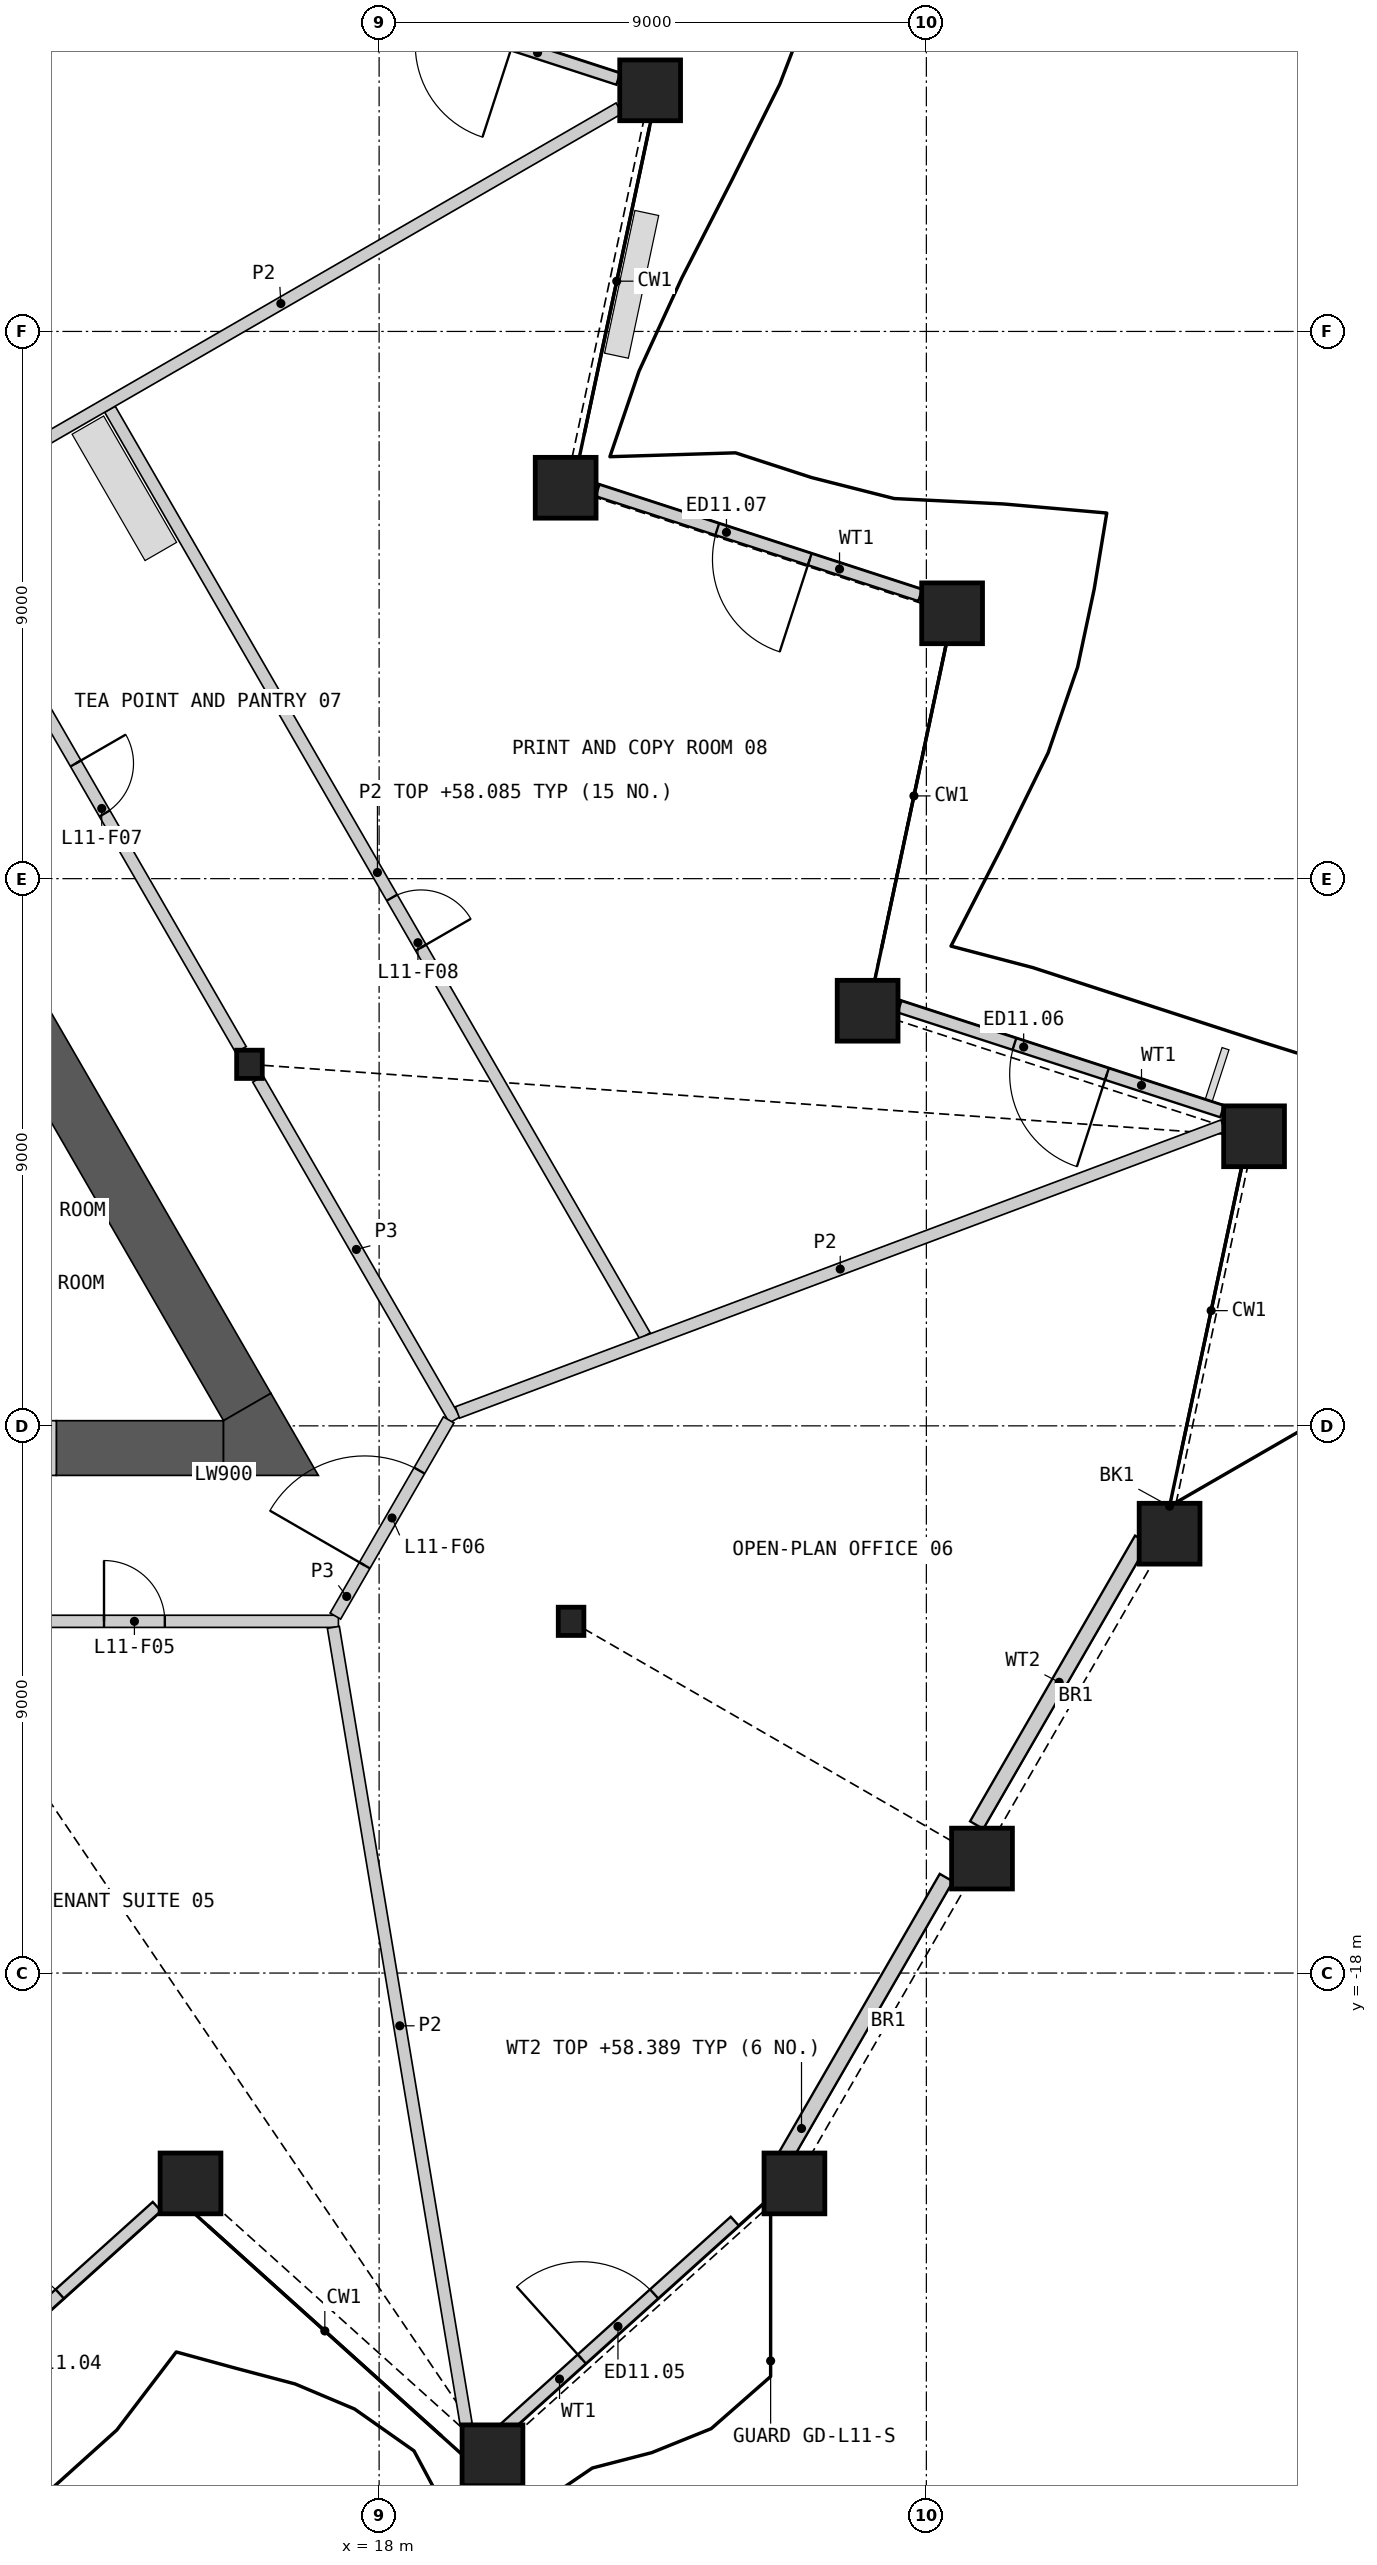
"""IFC4 building model, lengths in metres.
Left out: names, types, materials, properties, quantities, classifications, styles, units other than length and angle.
Written with IfcOpenShell. Run it as: python <this file> out.ifc"""

import sys

from ifc_helpers import new_model, si_unit, direction, frame, frame_2d, origin, origin_2d, place, context, subcontext, project, spatial, polyline, rectangle, hollow_rectangle, i_section, outline, extrude, element, fill, save


model = new_model("IFC4")
c1 = context("Model", 3, precision=1e-05, world=origin(), true_north=direction((0.0, 1.0)))
c2 = subcontext(c1, "Body", "Model", "MODEL_VIEW")
j1 = project(units=[si_unit("LENGTHUNIT", "METRE"), si_unit("PLANEANGLEUNIT", "RADIAN")], contexts=[c1])
p1 = place(None, origin())
s1 = spatial("IfcSite", under=j1, at=p1, CompositionType="ELEMENT")
p2 = place(p1, origin())
s2 = spatial("IfcBuilding", under=s1, at=p2, CompositionType="ELEMENT")
p3 = place(p2, frame((0.0, 0.0, 55.2)))
s3 = spatial("IfcBuildingStorey", under=s2, at=p3, CompositionType="ELEMENT", Elevation=55.2)
for number, where, z_axis, x_axis in (
    (1, (14.898, -21.46, 0.0), (0.0, 0.0, 1.0), (1.0, 0.0, 0.0)),
    (2, (19.864, -25.931, 0.0), (0.0, 0.0, 1.0), (1.0, 0.0, 0.0)),
    (3, (24.83, -21.46, 0.0), (0.0, 0.0, 1.0), (1.0, 0.0, 0.0)),
    (4, (27.915, -16.117, 0.0), (0.0, 0.0, 1.0), (1.0, 0.0, 0.0)),
    (5, (31.0, -10.774, 0.0), (0.0, 0.0, 1.0), (1.0, 0.0, 0.0)),
    (6, (32.389, -4.237, 0.0), (0.0, 0.0, 1.0), (1.0, 0.0, 0.0)),
    (7, (26.034, -2.172, 0.0), (0.0, 0.0, 1.0), (1.0, 0.0, 0.0)),
    (8, (27.423, 4.364, 0.0), (0.0, 0.0, 1.0), (1.0, 0.0, 0.0)),
    (9, (21.068, 6.429, 0.0), (0.0, 0.0, 1.0), (1.0, 0.0, 0.0)),
    (10, (22.457, 12.966, 0.0), (0.0, 0.0, 1.0), (1.0, 0.0, 0.0)),
):
    element("IfcColumn", number, at=place(p3, frame(where, z_axis=z_axis, x_axis=x_axis)), inside=s3, PredefinedType="COLUMN", context=c2, shape_type="SweptSolid", body=[
        extrude(hollow_rectangle(XDim=1.0, YDim=1.0, WallThickness=0.07, at=origin_2d()), origin(), (0.0, 0.0, 1.0), 4.2),
    ])
for number, where, z_axis, x_axis in (
    (11, (21.157, -12.215, 0.0), (0.0, 0.0, 1.0), (1.0, 0.0, 0.0)),
    (12, (15.868, -3.054, 0.0), (0.0, 0.0, 1.0), (1.0, 0.0, 0.0)),
):
    element("IfcColumn", number, at=place(p3, frame(where, z_axis=z_axis, x_axis=x_axis)), inside=s3, PredefinedType="COLUMN", context=c2, shape_type="SweptSolid", body=[
        extrude(i_section(OverallWidth=0.421, OverallDepth=0.465, WebThickness=0.045, FlangeThickness=0.072, at=origin_2d()), origin(), (0.0, 0.0, 1.0), 4.2),
    ])
p4 = place(p3, frame((10.231, -25.542, 0.0), z_axis=(0.0, 0.0, 1.0), x_axis=(0.743162549077, 0.669110921783, 0.0)))
e13 = element("IfcWall", 13, at=p4, inside=s3, PredefinedType="SOLIDWALL", context=c2, shape_type="SweptSolid", body=[
    extrude(rectangle(XDim=5.535, YDim=0.2, at=frame_2d((2.768, 0.0))), origin(), (0.0, 0.0, 1.0), 3.189),
])
p5 = place(p4, frame((1.786, 0.0, 0.0)))
e14 = element("IfcOpeningElement", 14, at=p5, cuts=e13, PredefinedType="OPENING", context=c2, shape_type="SweptSolid", body=[
    extrude(rectangle(XDim=1.6, YDim=2.4, at=frame_2d((0.8, 1.2))), frame((0.0, 0.11, 0.0), z_axis=(0.0, -1.0, 0.0), x_axis=(1.0, 0.0, 0.0)), (0.0, 0.0, 1.0), 0.22),
])
p6 = place(p3, frame((20.007, -25.542, 0.0), z_axis=(0.0, 0.0, 1.0), x_axis=(0.743150930715, 0.669123825743, 0.0)))
e15 = element("IfcWall", 15, at=p6, inside=s3, PredefinedType="SOLIDWALL", context=c2, shape_type="SweptSolid", body=[
    extrude(rectangle(XDim=5.171, YDim=0.2, at=frame_2d((2.585, 0.0))), origin(), (0.0, 0.0, 1.0), 3.189),
])
p7 = place(p6, frame((1.786, 0.0, 0.0)))
e16 = element("IfcOpeningElement", 16, at=p7, cuts=e15, PredefinedType="OPENING", context=c2, shape_type="SweptSolid", body=[
    extrude(rectangle(XDim=1.6, YDim=2.4, at=frame_2d((0.8, 1.2))), frame((0.0, 0.11, 0.0), z_axis=(0.0, -1.0, 0.0), x_axis=(1.0, 0.0, 0.0)), (0.0, 0.0, 1.0), 0.22),
])
p8 = place(p3, frame((24.682, -21.015, 0.0), z_axis=(0.0, 0.0, 1.0), x_axis=(0.500008603535, 0.866020436474, 0.0)))
e17 = element("IfcWall", 17, at=p8, inside=s3, PredefinedType="SOLIDWALL", context=c2, shape_type="SweptSolid", body=[
    extrude(rectangle(XDim=5.293, YDim=0.25, at=frame_2d((2.646, 0.0))), origin(), (0.0, 0.0, 1.0), 3.189),
])
p9 = place(p3, frame((27.827, -15.567, 0.0), z_axis=(0.0, 0.0, 1.0), x_axis=(0.499991204533, 0.86603048179, 0.0)))
e18 = element("IfcWall", 18, at=p9, inside=s3, PredefinedType="SOLIDWALL", context=c2, shape_type="SweptSolid", body=[
    extrude(rectangle(XDim=5.426, YDim=0.25, at=frame_2d((2.713, 0.0))), origin(), (0.0, 0.0, 1.0), 3.189),
])
p10 = place(p3, frame((31.865, -3.83, 0.0), z_axis=(0.0, 0.0, 1.0), x_axis=(-0.951054004345, 0.309024725255, 0.0)))
e19 = element("IfcWall", 19, at=p10, inside=s3, PredefinedType="SOLIDWALL", context=c2, shape_type="SweptSolid", body=[
    extrude(rectangle(XDim=5.579, YDim=0.2, at=frame_2d((2.79, 0.0))), origin(), (0.0, 0.0, 1.0), 3.189),
])
p11 = place(p10, frame((1.992, 0.0, 0.0)))
e20 = element("IfcOpeningElement", 20, at=p11, cuts=e19, PredefinedType="OPENING", context=c2, shape_type="SweptSolid", body=[
    extrude(rectangle(XDim=1.6, YDim=2.4, at=frame_2d((0.8, 1.2))), frame((0.0, 0.11, 0.0), z_axis=(0.0, -1.0, 0.0), x_axis=(1.0, 0.0, 0.0)), (0.0, 0.0, 1.0), 0.22),
])
p12 = place(p3, frame((26.899, 4.661, 0.0), z_axis=(0.0, 0.0, 1.0), x_axis=(-0.951054004345, 0.309024725255, 0.0)))
e21 = element("IfcWall", 21, at=p12, inside=s3, PredefinedType="SOLIDWALL", context=c2, shape_type="SweptSolid", body=[
    extrude(rectangle(XDim=5.579, YDim=0.2, at=frame_2d((2.79, 0.0))), origin(), (0.0, 0.0, 1.0), 3.189),
])
p13 = place(p12, frame((1.91, 0.0, 0.0)))
e22 = element("IfcOpeningElement", 22, at=p13, cuts=e21, PredefinedType="OPENING", context=c2, shape_type="SweptSolid", body=[
    extrude(rectangle(XDim=1.6, YDim=2.4, at=frame_2d((0.8, 1.2))), frame((0.0, 0.11, 0.0), z_axis=(0.0, -1.0, 0.0), x_axis=(1.0, 0.0, 0.0)), (0.0, 0.0, 1.0), 0.22),
])
p14 = place(p3, frame((21.933, 13.153, 0.0), z_axis=(0.0, 0.0, 1.0), x_axis=(-0.951066864375, 0.308985144444, 0.0)))
e23 = element("IfcWall", 23, at=p14, inside=s3, PredefinedType="SOLIDWALL", context=c2, shape_type="SweptSolid", body=[
    extrude(rectangle(XDim=5.579, YDim=0.2, at=frame_2d((2.79, 0.0))), origin(), (0.0, 0.0, 1.0), 3.189),
])
p15 = place(p14, frame((1.828, 0.0, 0.0)))
e24 = element("IfcOpeningElement", 24, at=p15, cuts=e23, PredefinedType="OPENING", context=c2, shape_type="SweptSolid", body=[
    extrude(rectangle(XDim=1.6, YDim=2.4, at=frame_2d((0.8, 1.2))), frame((0.0, 0.11, 0.0), z_axis=(0.0, -1.0, 0.0), x_axis=(1.0, 0.0, 0.0)), (0.0, 0.0, 1.0), 0.22),
])
p16 = place(p3, frame((12.691, -9.365, 0.0), z_axis=(0.0, 0.0, 1.0), x_axis=(1.0, 0.0, 0.0)))
e25 = element("IfcWall", 25, at=p16, inside=s3, PredefinedType="SHEAR", context=c2, shape_type="SweptSolid", body=[
    extrude(rectangle(XDim=2.75, YDim=0.9, at=frame_2d((1.375, 0.0))), origin(), (0.0, 0.0, 1.0), 3.8),
])
p17 = place(p3, frame((15.831, -8.69, 0.0), z_axis=(0.0, 0.0, 1.0), x_axis=(-0.499995435471, 0.8660280391, 0.0)))
e26 = element("IfcWall", 26, at=p17, inside=s3, PredefinedType="SHEAR", context=c2, shape_type="SweptSolid", body=[
    extrude(rectangle(XDim=8.232, YDim=0.9, at=frame_2d((4.116, 0.0))), origin(), (0.0, 0.0, 1.0), 3.8),
])
p18 = place(p3, origin())
e27 = element("IfcWall", 27, at=p18, inside=s3, PredefinedType="SHEAR", context=c2, shape_type="SweptSolid", body=[
    extrude(outline(polyline([(15.441, -9.815), (15.441, -8.915), (16.221, -8.465), (17.0, -9.815), (15.441, -9.815)])), origin(), (0.0, 0.0, 1.0), 3.8),
])
p19 = place(p3, frame((10.491, -9.365, 0.0), z_axis=(0.0, 0.0, 1.0), x_axis=(1.0, 0.0, 0.0)))
e28 = element("IfcWall", 28, at=p19, inside=s3, PredefinedType="SHEAR", context=c2, shape_type="SweptSolid", body=[
    extrude(rectangle(XDim=2.2, YDim=0.9, at=frame_2d((1.1, 0.0))), origin(), (0.0, 0.0, 1.0), 3.8),
])
p20 = place(p19, frame((0.6, 0.0, 0.0)))
e29 = element("IfcOpeningElement", 29, at=p20, cuts=e28, PredefinedType="OPENING", context=c2, shape_type="SweptSolid", body=[
    extrude(rectangle(XDim=1.0, YDim=2.1, at=frame_2d((0.5, 1.05))), frame((0.0, 0.46, 0.0), z_axis=(0.0, -1.0, 0.0), x_axis=(1.0, 0.0, 0.0)), (0.0, 0.0, 1.0), 0.92),
])
p21 = place(p3, frame((10.719, 5.865, 0.0), z_axis=(0.0, 0.0, 1.0), x_axis=(0.49999175339, -0.866030164915, 0.0)))
e30 = element("IfcWall", 30, at=p21, inside=s3, PredefinedType="PARTITIONING", context=c2, shape_type="SweptSolid", body=[
    extrude(rectangle(XDim=10.019, YDim=0.2, at=frame_2d((5.009, 0.0))), origin(), (0.0, 0.0, 1.0), 3.8),
])
p22 = place(p21, frame((4.585, 0.0, 0.0)))
e31 = element("IfcOpeningElement", 31, at=p22, cuts=e30, PredefinedType="OPENING", context=c2, shape_type="SweptSolid", body=[
    extrude(rectangle(XDim=0.95, YDim=2.1, at=frame_2d((0.475, 1.05))), frame((0.0, 0.11, 0.0), z_axis=(0.0, -1.0, 0.0), x_axis=(1.0, 0.0, 0.0)), (0.0, 0.0, 1.0), 0.22),
])
p23 = place(p3, frame((10.821, -12.215, 0.0), z_axis=(0.0, 0.0, 1.0), x_axis=(1.0, 0.0, 0.0)))
e32 = element("IfcWall", 32, at=p23, inside=s3, PredefinedType="PARTITIONING", context=c2, shape_type="SweptSolid", body=[
    extrude(rectangle(XDim=6.51, YDim=0.2, at=frame_2d((3.255, 0.0))), origin(), (0.0, 0.0, 1.0), 3.8),
])
p24 = place(p23, frame((2.655, 0.0, 0.0)))
e33 = element("IfcOpeningElement", 33, at=p24, cuts=e32, PredefinedType="OPENING", context=c2, shape_type="SweptSolid", body=[
    extrude(rectangle(XDim=1.0, YDim=2.1, at=frame_2d((0.5, 1.05))), frame((0.0, 0.11, 0.0), z_axis=(0.0, -1.0, 0.0), x_axis=(1.0, 0.0, 0.0)), (0.0, 0.0, 1.0), 0.22),
])
p25 = place(p3, frame((16.008, -3.296, 0.0), z_axis=(0.0, 0.0, 1.0), x_axis=(0.499984737558, -0.86603421538, 0.0)))
e34 = element("IfcWall", 34, at=p25, inside=s3, PredefinedType="PARTITIONING", context=c2, shape_type="SweptSolid", body=[
    extrude(rectangle(XDim=6.473, YDim=0.2, at=frame_2d((3.236, 0.0))), origin(), (0.0, 0.0, 1.0), 3.8),
])
p26 = place(p3, frame((17.281, -12.128, 0.0), z_axis=(0.0, 0.0, 1.0), x_axis=(0.499958791762, 0.866049194065, 0.0)))
e35 = element("IfcWall", 35, at=p26, inside=s3, PredefinedType="PARTITIONING", context=c2, shape_type="SweptSolid", body=[
    extrude(rectangle(XDim=3.726, YDim=0.2, at=frame_2d((1.863, 0.0))), origin(), (0.0, 0.0, 1.0), 3.8),
])
p27 = place(p26, frame((0.963, 0.0, 0.0)))
e36 = element("IfcOpeningElement", 36, at=p27, cuts=e35, PredefinedType="OPENING", context=c2, shape_type="SweptSolid", body=[
    extrude(rectangle(XDim=1.8, YDim=2.1, at=frame_2d((0.9, 1.05))), frame((0.0, 0.11, 0.0), z_axis=(0.0, -1.0, 0.0), x_axis=(1.0, 0.0, 0.0)), (0.0, 0.0, 1.0), 0.22),
])
p28 = place(p3, frame((13.573, 7.721, 0.0), z_axis=(0.0, 0.0, 1.0), x_axis=(0.499990262232, -0.866031025814, 0.0)))
e37 = element("IfcWall", 37, at=p28, inside=s3, PredefinedType="PARTITIONING", context=c2, shape_type="SweptSolid", body=[
    extrude(rectangle(XDim=17.597, YDim=0.2, at=frame_2d((8.799, 0.0))), origin(), (0.0, 0.0, 1.0), 2.885),
])
p29 = place(p28, frame((9.277, 0.0, 0.0)))
e38 = element("IfcOpeningElement", 38, at=p29, cuts=e37, PredefinedType="OPENING", context=c2, shape_type="SweptSolid", body=[
    extrude(rectangle(XDim=0.95, YDim=2.1, at=frame_2d((0.475, 1.05))), frame((0.0, 0.11, 0.0), z_axis=(0.0, -1.0, 0.0), x_axis=(1.0, 0.0, 0.0)), (0.0, 0.0, 1.0), 0.22),
])
p30 = place(p3, frame((19.288, -8.78, 0.0), z_axis=(0.0, 0.0, 1.0), x_axis=(0.93644254502, 0.350820979814, 0.0)))
e39 = element("IfcWall", 39, at=p30, inside=s3, PredefinedType="PARTITIONING", context=c2, shape_type="SweptSolid", body=[
    extrude(rectangle(XDim=13.447, YDim=0.2, at=frame_2d((6.723, 0.0))), origin(), (0.0, 0.0, 1.0), 2.885),
])
p31 = place(p3, frame((17.247, -12.314, 0.0), z_axis=(0.0, 0.0, 1.0), x_axis=(0.164396008001, -0.986394420378, 0.0)))
e40 = element("IfcWall", 40, at=p31, inside=s3, PredefinedType="PARTITIONING", context=c2, shape_type="SweptSolid", body=[
    extrude(rectangle(XDim=13.289, YDim=0.2, at=frame_2d((6.644, 0.0))), origin(), (0.0, 0.0, 1.0), 2.885),
])
p32 = place(p3, frame((10.821, 6.247, 0.0), z_axis=(0.0, 0.0, 1.0), x_axis=(0.866026729935, 0.499997703033, 0.0)))
e41 = element("IfcWall", 41, at=p32, inside=s3, PredefinedType="PARTITIONING", context=c2, shape_type="SweptSolid", body=[
    extrude(rectangle(XDim=12.848, YDim=0.2, at=frame_2d((6.424, 0.0))), origin(), (0.0, 0.0, 1.0), 2.885),
])
p33 = place(p5, origin())
e42 = element("IfcDoor", 42, at=p33, inside=s3, OperationType="DOUBLE_DOOR_SINGLE_SWING", PredefinedType="DOOR", context=c2, shape_type="SweptSolid", body=[
    extrude(rectangle(XDim=1.6, YDim=2.4, at=frame_2d((0.8, 1.2))), frame((0.0, 0.025, 0.0), z_axis=(0.0, -1.0, 0.0), x_axis=(1.0, 0.0, 0.0)), (0.0, 0.0, 1.0), 0.05),
])
fill(e14, e42)
p34 = place(p7, origin())
e43 = element("IfcDoor", 43, at=p34, inside=s3, OperationType="DOUBLE_DOOR_SINGLE_SWING", PredefinedType="DOOR", context=c2, shape_type="SweptSolid", body=[
    extrude(rectangle(XDim=1.6, YDim=2.4, at=frame_2d((0.8, 1.2))), frame((0.0, 0.025, 0.0), z_axis=(0.0, -1.0, 0.0), x_axis=(1.0, 0.0, 0.0)), (0.0, 0.0, 1.0), 0.05),
])
fill(e16, e43)
p35 = place(p11, origin())
e44 = element("IfcDoor", 44, at=p35, inside=s3, OperationType="DOUBLE_DOOR_SINGLE_SWING", PredefinedType="DOOR", context=c2, shape_type="SweptSolid", body=[
    extrude(rectangle(XDim=1.6, YDim=2.4, at=frame_2d((0.8, 1.2))), frame((0.0, 0.025, 0.0), z_axis=(0.0, -1.0, 0.0), x_axis=(1.0, 0.0, 0.0)), (0.0, 0.0, 1.0), 0.05),
])
fill(e20, e44)
p36 = place(p13, origin())
e45 = element("IfcDoor", 45, at=p36, inside=s3, OperationType="DOUBLE_DOOR_SINGLE_SWING", PredefinedType="DOOR", context=c2, shape_type="SweptSolid", body=[
    extrude(rectangle(XDim=1.6, YDim=2.4, at=frame_2d((0.8, 1.2))), frame((0.0, 0.025, 0.0), z_axis=(0.0, -1.0, 0.0), x_axis=(1.0, 0.0, 0.0)), (0.0, 0.0, 1.0), 0.05),
])
fill(e22, e45)
p37 = place(p24, origin())
e46 = element("IfcDoor", 46, at=p37, inside=s3, OperationType="SINGLE_SWING_LEFT", PredefinedType="DOOR", context=c2, shape_type="SweptSolid", body=[
    extrude(rectangle(XDim=1.0, YDim=2.1, at=frame_2d((0.5, 1.05))), frame((0.0, 0.025, 0.0), z_axis=(0.0, -1.0, 0.0), x_axis=(1.0, 0.0, 0.0)), (0.0, 0.0, 1.0), 0.05),
])
fill(e33, e46)
p38 = place(p27, origin())
e47 = element("IfcDoor", 47, at=p38, inside=s3, OperationType="DOUBLE_DOOR_SINGLE_SWING", PredefinedType="DOOR", context=c2, shape_type="SweptSolid", body=[
    extrude(rectangle(XDim=1.8, YDim=2.1, at=frame_2d((0.9, 1.05))), frame((0.0, 0.025, 0.0), z_axis=(0.0, -1.0, 0.0), x_axis=(1.0, 0.0, 0.0)), (0.0, 0.0, 1.0), 0.05),
])
fill(e36, e47)
p39 = place(p22, origin())
e48 = element("IfcDoor", 48, at=p39, inside=s3, OperationType="SINGLE_SWING_LEFT", PredefinedType="DOOR", context=c2, shape_type="SweptSolid", body=[
    extrude(rectangle(XDim=0.95, YDim=2.1, at=frame_2d((0.475, 1.05))), frame((0.0, 0.025, 0.0), z_axis=(0.0, -1.0, 0.0), x_axis=(1.0, 0.0, 0.0)), (0.0, 0.0, 1.0), 0.05),
])
fill(e31, e48)
p40 = place(p29, origin())
e49 = element("IfcDoor", 49, at=p40, inside=s3, OperationType="SINGLE_SWING_RIGHT", PredefinedType="DOOR", context=c2, shape_type="SweptSolid", body=[
    extrude(rectangle(XDim=0.95, YDim=2.1, at=frame_2d((0.475, 1.05))), frame((0.0, 0.025, 0.0), z_axis=(0.0, -1.0, 0.0), x_axis=(1.0, 0.0, 0.0)), (0.0, 0.0, 1.0), 0.05),
])
fill(e38, e49)
save(model, sys.argv[1])
